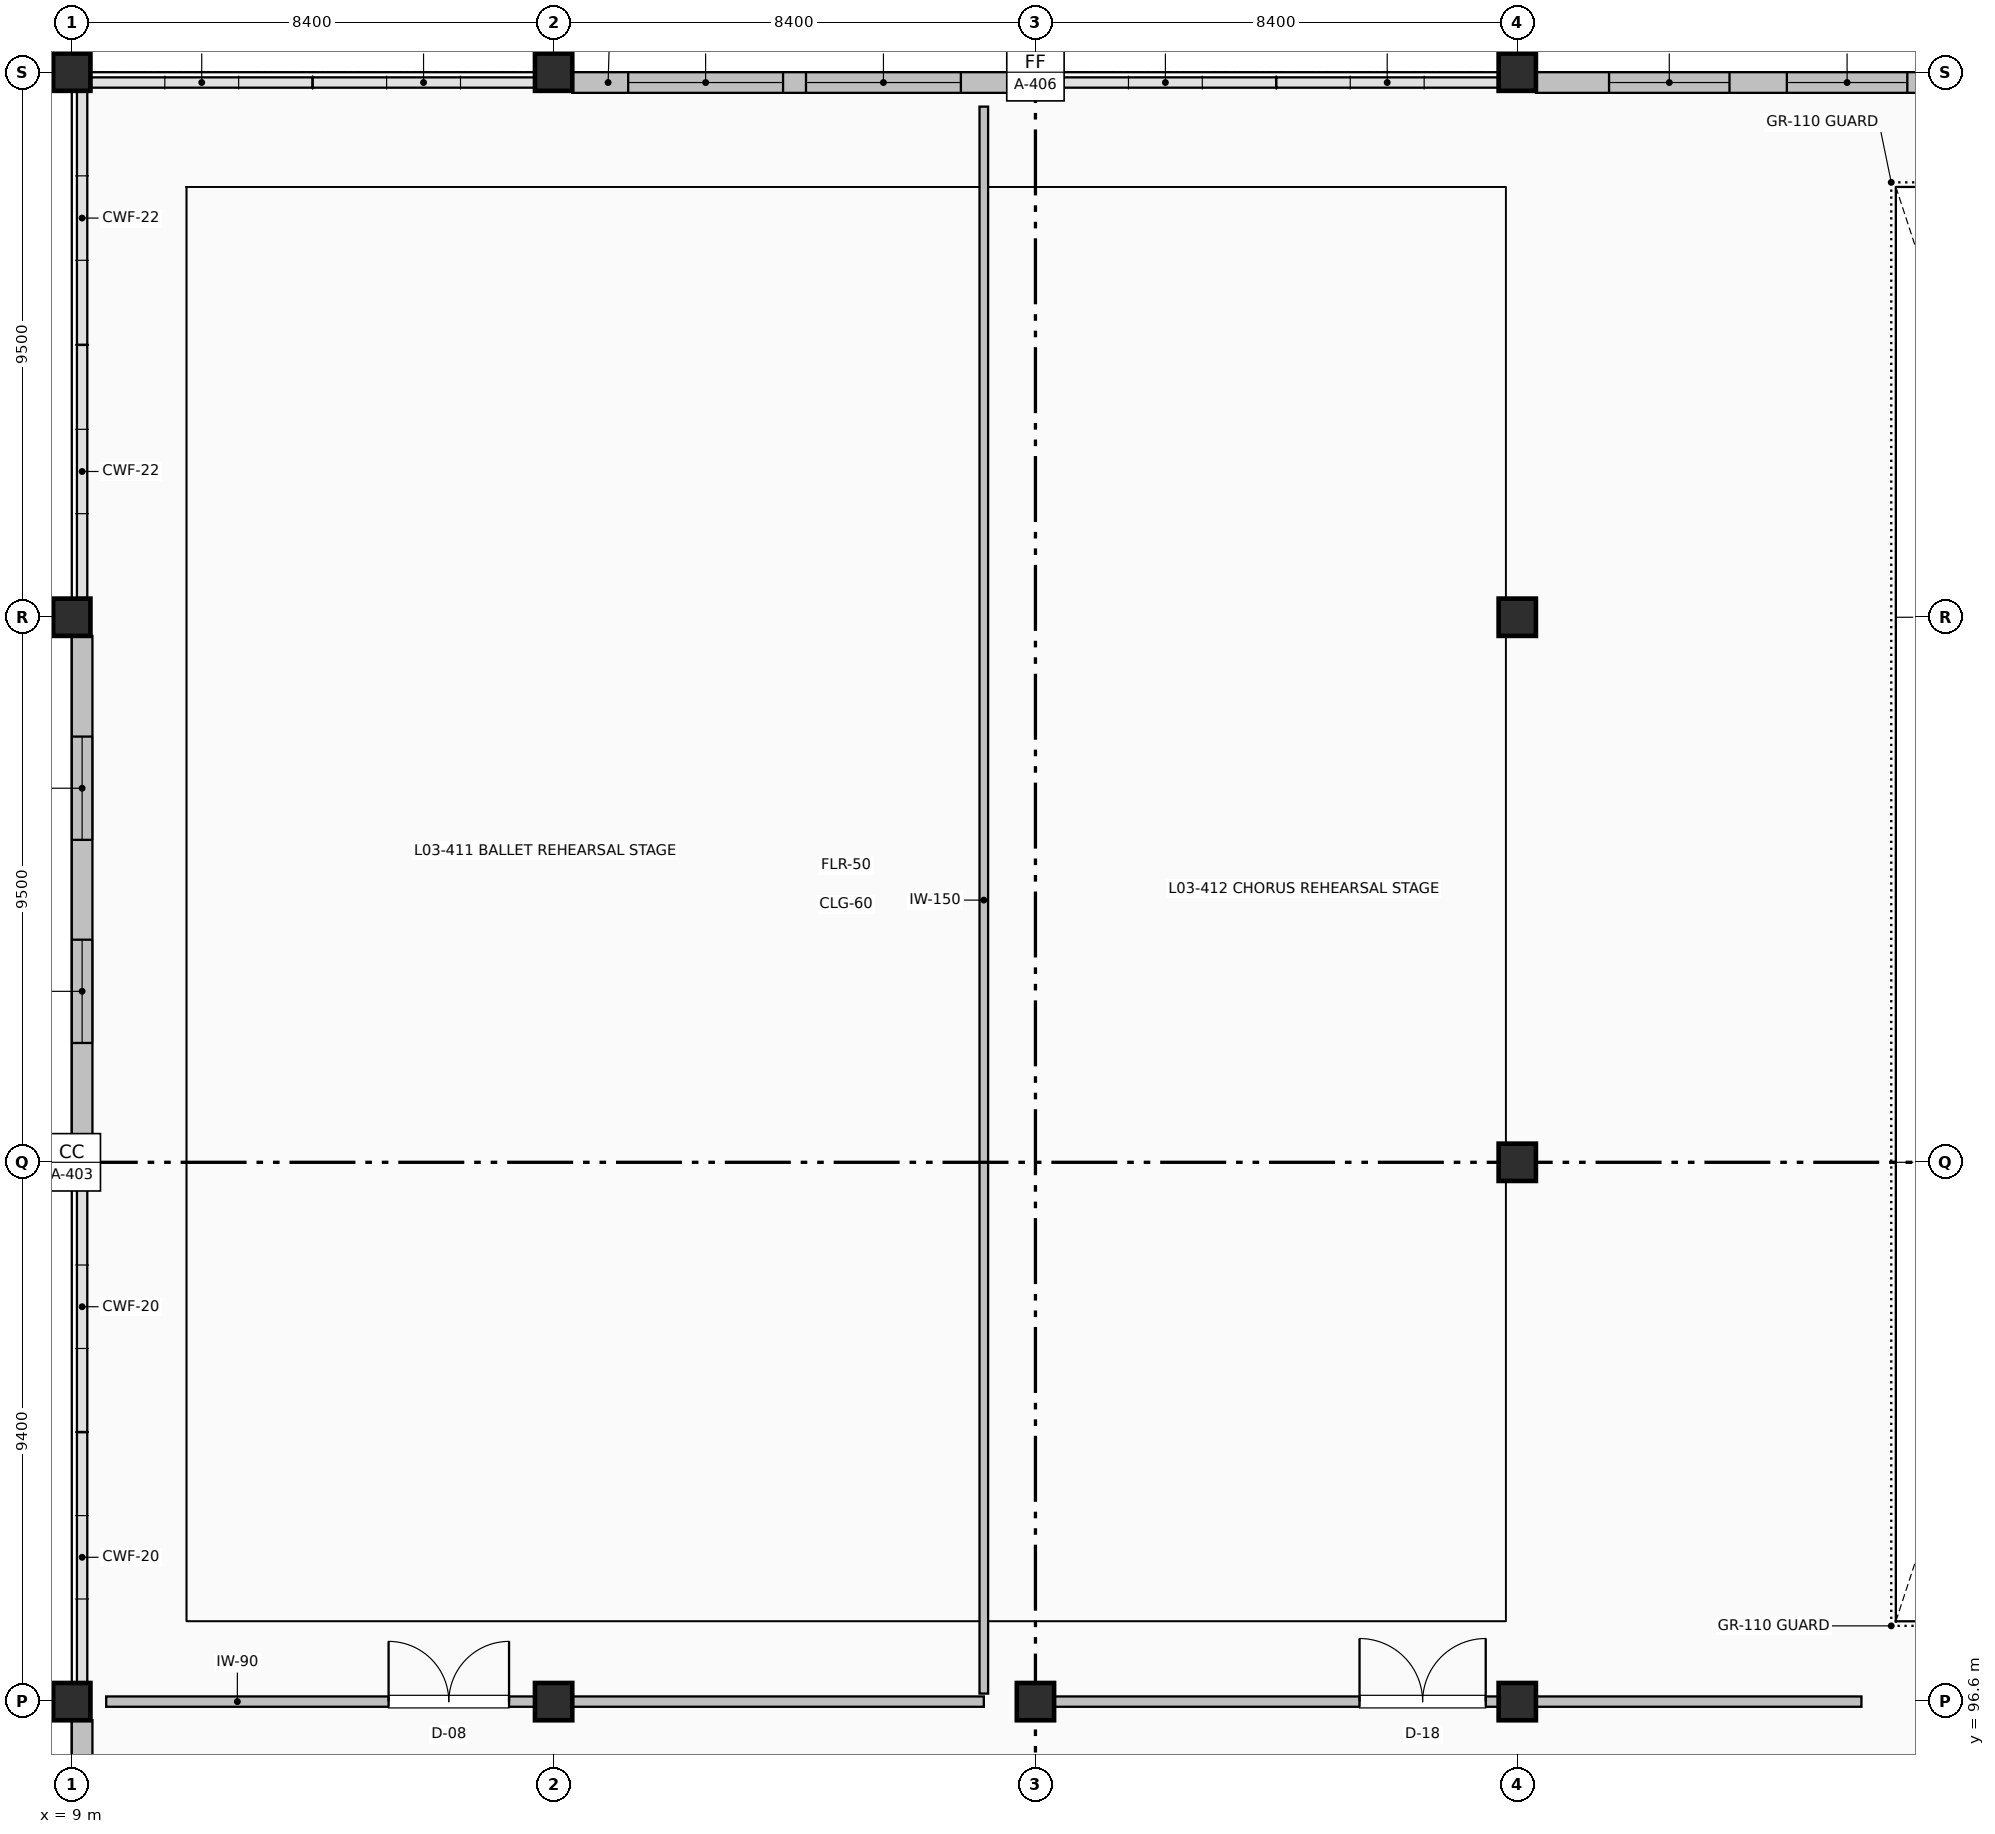
"""IFC4 building model, lengths in metres.
Left out: names, types, materials, properties, quantities, classifications, styles, units other than length and angle.
Written with IfcOpenShell. Run it as: python <this file> out.ifc"""

import sys

from ifc_helpers import new_model, si_unit, direction, frame, frame_2d, origin, origin_2d, place, context, subcontext, project, spatial, rectangle, extrude, element, fill, save


model = new_model("IFC4")
c1 = context("Model", 3, precision=1e-05, world=origin(), true_north=direction((0.0, 1.0)))
c2 = subcontext(c1, "Body", "Model", "MODEL_VIEW")
j1 = project(units=[si_unit("LENGTHUNIT", "METRE"), si_unit("PLANEANGLEUNIT", "RADIAN")], contexts=[c1])
p1 = place(None, origin())
s1 = spatial("IfcSite", under=j1, at=p1, CompositionType="ELEMENT")
p2 = place(p1, origin())
s2 = spatial("IfcBuilding", under=s1, at=p2, CompositionType="ELEMENT")
p3 = place(p2, frame((0.0, 0.0, 15.0)))
s3 = spatial("IfcBuildingStorey", under=s2, at=p3, CompositionType="ELEMENT", Elevation=15.0)
for number, where, z_axis, x_axis in (
    (1, (9.0, 96.6, 0.0), (0.0, 0.0, 1.0), (1.0, 0.0, 0.0)),
    (2, (9.0, 106.0, 0.0), (0.0, 0.0, 1.0), (1.0, 0.0, 0.0)),
    (3, (9.0, 115.5, 0.0), (0.0, 0.0, 1.0), (1.0, 0.0, 0.0)),
    (4, (9.0, 125.0, 0.0), (0.0, 0.0, 1.0), (1.0, 0.0, 0.0)),
    (5, (17.4, 96.6, 0.0), (0.0, 0.0, 1.0), (1.0, 0.0, 0.0)),
    (6, (17.4, 125.0, 0.0), (0.0, 0.0, 1.0), (1.0, 0.0, 0.0)),
    (7, (25.8, 96.6, 0.0), (0.0, 0.0, 1.0), (1.0, 0.0, 0.0)),
    (8, (25.8, 125.0, 0.0), (0.0, 0.0, 1.0), (1.0, 0.0, 0.0)),
    (9, (34.2, 96.6, 0.0), (0.0, 0.0, 1.0), (1.0, 0.0, 0.0)),
    (10, (34.2, 106.0, 0.0), (0.0, 0.0, 1.0), (1.0, 0.0, 0.0)),
    (11, (34.2, 115.5, 0.0), (0.0, 0.0, 1.0), (1.0, 0.0, 0.0)),
    (12, (34.2, 125.0, 0.0), (0.0, 0.0, 1.0), (1.0, 0.0, 0.0)),
):
    element("IfcColumn", number, at=place(p3, frame(where, z_axis=z_axis, x_axis=x_axis)), inside=s3, PredefinedType="COLUMN", context=c2, shape_type="SweptSolid", body=[
        extrude(rectangle(XDim=0.65, YDim=0.65, at=origin_2d()), origin(), (0.0, 0.0, 1.0), 4.5),
    ])
p4 = place(p3, frame((17.725, 124.82, 0.0), z_axis=(0.0, 0.0, 1.0), x_axis=(1.0, 0.0, 0.0)))
e13 = element("IfcWall", 13, at=p4, inside=s3, PredefinedType="SOLIDWALL", context=c2, shape_type="SweptSolid", body=[
    extrude(rectangle(XDim=7.75, YDim=0.36, at=frame_2d((3.875, 0.0))), origin(), (0.0, 0.0, 1.0), 4.2),
])
p5 = place(p4, frame((0.975, 0.0, 0.9)))
e14 = element("IfcOpeningElement", 14, at=p5, cuts=e13, PredefinedType="OPENING", context=c2, shape_type="SweptSolid", body=[
    extrude(rectangle(XDim=2.7, YDim=2.1, at=frame_2d((1.35, 1.05))), frame((0.0, 0.19, 0.0), z_axis=(0.0, -1.0, 0.0), x_axis=(1.0, 0.0, 0.0)), (0.0, 0.0, 1.0), 0.38),
])
p6 = place(p4, frame((4.075, 0.0, 0.9)))
e15 = element("IfcOpeningElement", 15, at=p6, cuts=e13, PredefinedType="OPENING", context=c2, shape_type="SweptSolid", body=[
    extrude(rectangle(XDim=2.7, YDim=2.1, at=frame_2d((1.35, 1.05))), frame((0.0, 0.19, 0.0), z_axis=(0.0, -1.0, 0.0), x_axis=(1.0, 0.0, 0.0)), (0.0, 0.0, 1.0), 0.38),
])
p7 = place(p3, frame((34.525, 124.82, 0.0), z_axis=(0.0, 0.0, 1.0), x_axis=(1.0, 0.0, 0.0)))
e16 = element("IfcWall", 16, at=p7, inside=s3, PredefinedType="SOLIDWALL", context=c2, shape_type="SweptSolid", body=[
    extrude(rectangle(XDim=7.75, YDim=0.36, at=frame_2d((3.875, 0.0))), origin(), (0.0, 0.0, 1.0), 4.2),
])
p8 = place(p7, frame((1.275, 0.0, 0.9)))
e17 = element("IfcOpeningElement", 17, at=p8, cuts=e16, PredefinedType="OPENING", context=c2, shape_type="SweptSolid", body=[
    extrude(rectangle(XDim=2.1, YDim=2.1, at=frame_2d((1.05, 1.05))), frame((0.0, 0.19, 0.0), z_axis=(0.0, -1.0, 0.0), x_axis=(1.0, 0.0, 0.0)), (0.0, 0.0, 1.0), 0.38),
])
p9 = place(p7, frame((4.375, 0.0, 0.9)))
e18 = element("IfcOpeningElement", 18, at=p9, cuts=e16, PredefinedType="OPENING", context=c2, shape_type="SweptSolid", body=[
    extrude(rectangle(XDim=2.1, YDim=2.1, at=frame_2d((1.05, 1.05))), frame((0.0, 0.19, 0.0), z_axis=(0.0, -1.0, 0.0), x_axis=(1.0, 0.0, 0.0)), (0.0, 0.0, 1.0), 0.38),
])
p10 = place(p3, frame((9.18, 87.61, 0.0), z_axis=(0.0, 0.0, 1.0), x_axis=(0.0, 1.0, 0.0)))
e19 = element("IfcWall", 19, at=p10, inside=s3, PredefinedType="SOLIDWALL", context=c2, shape_type="SweptSolid", body=[
    extrude(rectangle(XDim=8.665, YDim=0.36, at=frame_2d((4.333, 0.0))), origin(), (0.0, 0.0, 1.0), 3.709),
])
p11 = place(p10, frame((1.85, 0.0, 0.9)))
e20 = element("IfcOpeningElement", 20, at=p11, cuts=e19, PredefinedType="OPENING", context=c2, shape_type="SweptSolid", body=[
    extrude(rectangle(XDim=1.5, YDim=2.1, at=frame_2d((0.75, 1.05))), frame((0.0, 0.19, 0.0), z_axis=(0.0, -1.0, 0.0), x_axis=(1.0, 0.0, 0.0)), (0.0, 0.0, 1.0), 0.38),
])
p12 = place(p10, frame((5.316, 0.0, 0.9)))
e21 = element("IfcOpeningElement", 21, at=p12, cuts=e19, PredefinedType="OPENING", context=c2, shape_type="SweptSolid", body=[
    extrude(rectangle(XDim=1.5, YDim=2.1, at=frame_2d((0.75, 1.05))), frame((0.0, 0.19, 0.0), z_axis=(0.0, -1.0, 0.0), x_axis=(1.0, 0.0, 0.0)), (0.0, 0.0, 1.0), 0.38),
])
p13 = place(p3, frame((9.18, 106.325, 0.0), z_axis=(0.0, 0.0, 1.0), x_axis=(0.0, 1.0, 0.0)))
e22 = element("IfcWall", 22, at=p13, inside=s3, PredefinedType="SOLIDWALL", context=c2, shape_type="SweptSolid", body=[
    extrude(rectangle(XDim=8.85, YDim=0.36, at=frame_2d((4.425, 0.0))), origin(), (0.0, 0.0, 1.0), 3.709),
])
p14 = place(p13, frame((1.755, 0.0, 0.9)))
e23 = element("IfcOpeningElement", 23, at=p14, cuts=e22, PredefinedType="OPENING", context=c2, shape_type="SweptSolid", body=[
    extrude(rectangle(XDim=1.8, YDim=2.1, at=frame_2d((0.9, 1.05))), frame((0.0, 0.19, 0.0), z_axis=(0.0, -1.0, 0.0), x_axis=(1.0, 0.0, 0.0)), (0.0, 0.0, 1.0), 0.38),
])
p15 = place(p13, frame((5.295, 0.0, 0.9)))
e24 = element("IfcOpeningElement", 24, at=p15, cuts=e22, PredefinedType="OPENING", context=c2, shape_type="SweptSolid", body=[
    extrude(rectangle(XDim=1.8, YDim=2.1, at=frame_2d((0.9, 1.05))), frame((0.0, 0.19, 0.0), z_axis=(0.0, -1.0, 0.0), x_axis=(1.0, 0.0, 0.0)), (0.0, 0.0, 1.0), 0.38),
])
p16 = place(p3, frame((9.6, 96.6, 0.0), z_axis=(0.0, 0.0, 1.0), x_axis=(1.0, 0.0, 0.0)))
e25 = element("IfcWall", 25, at=p16, inside=s3, PredefinedType="PARTITIONING", context=c2, shape_type="SweptSolid", body=[
    extrude(rectangle(XDim=7.475, YDim=0.18, at=frame_2d((3.737, 0.0))), origin(), (0.0, 0.0, 1.0), 4.192),
])
p17 = place(p16, frame((4.923, 0.0, 0.0)))
e26 = element("IfcOpeningElement", 26, at=p17, cuts=e25, PredefinedType="OPENING", context=c2, shape_type="SweptSolid", body=[
    extrude(rectangle(XDim=2.1, YDim=2.25, at=frame_2d((1.05, 1.125))), frame((0.0, 0.1, 0.0), z_axis=(0.0, -1.0, 0.0), x_axis=(1.0, 0.0, 0.0)), (0.0, 0.0, 1.0), 0.2),
])
p18 = place(p3, frame((17.725, 96.6, 0.0), z_axis=(0.0, 0.0, 1.0), x_axis=(1.0, 0.0, 0.0)))
e27 = element("IfcWall", 27, at=p18, inside=s3, PredefinedType="PARTITIONING", context=c2, shape_type="SweptSolid", body=[
    extrude(rectangle(XDim=7.175, YDim=0.18, at=frame_2d((3.587, 0.0))), origin(), (0.0, 0.0, 1.0), 4.192),
])
p19 = place(p3, frame((24.9, 96.74, 0.0), z_axis=(0.0, 0.0, 1.0), x_axis=(0.0, 1.0, 0.0)))
e28 = element("IfcWall", 28, at=p19, inside=s3, PredefinedType="PARTITIONING", context=c2, shape_type="SweptSolid", body=[
    extrude(rectangle(XDim=27.66, YDim=0.15, at=frame_2d((13.83, 0.0))), origin(), (0.0, 0.0, 1.0), 4.192),
])
p20 = place(p3, frame((26.125, 96.6, 0.0), z_axis=(0.0, 0.0, 1.0), x_axis=(1.0, 0.0, 0.0)))
e29 = element("IfcWall", 29, at=p20, inside=s3, PredefinedType="PARTITIONING", context=c2, shape_type="SweptSolid", body=[
    extrude(rectangle(XDim=7.75, YDim=0.18, at=frame_2d((3.875, 0.0))), origin(), (0.0, 0.0, 1.0), 4.192),
])
p21 = place(p20, frame((5.325, 0.0, 0.0)))
e30 = element("IfcOpeningElement", 30, at=p21, cuts=e29, PredefinedType="OPENING", context=c2, shape_type="SweptSolid", body=[
    extrude(rectangle(XDim=2.2, YDim=2.32, at=frame_2d((1.1, 1.16))), frame((0.0, 0.1, 0.0), z_axis=(0.0, -1.0, 0.0), x_axis=(1.0, 0.0, 0.0)), (0.0, 0.0, 1.0), 0.2),
])
p22 = place(p3, frame((34.525, 96.6, 0.0), z_axis=(0.0, 0.0, 1.0), x_axis=(1.0, 0.0, 0.0)))
e31 = element("IfcWall", 31, at=p22, inside=s3, PredefinedType="PARTITIONING", context=c2, shape_type="SweptSolid", body=[
    extrude(rectangle(XDim=5.675, YDim=0.18, at=frame_2d((2.837, 0.0))), origin(), (0.0, 0.0, 1.0), 4.192),
])
p23 = place(p5, origin())
e32 = element("IfcWindow", 32, at=p23, inside=s3, PartitioningType="SINGLE_PANEL", PredefinedType="WINDOW", context=c2, shape_type="SweptSolid", body=[
    extrude(rectangle(XDim=2.7, YDim=2.1, at=frame_2d((1.35, 1.05))), frame((0.0, 0.03, 0.0), z_axis=(0.0, -1.0, 0.0), x_axis=(1.0, 0.0, 0.0)), (0.0, 0.0, 1.0), 0.06),
])
fill(e14, e32)
p24 = place(p6, origin())
e33 = element("IfcWindow", 33, at=p24, inside=s3, PartitioningType="SINGLE_PANEL", PredefinedType="WINDOW", context=c2, shape_type="SweptSolid", body=[
    extrude(rectangle(XDim=2.7, YDim=2.1, at=frame_2d((1.35, 1.05))), frame((0.0, 0.03, 0.0), z_axis=(0.0, -1.0, 0.0), x_axis=(1.0, 0.0, 0.0)), (0.0, 0.0, 1.0), 0.06),
])
fill(e15, e33)
p25 = place(p8, origin())
e34 = element("IfcWindow", 34, at=p25, inside=s3, PartitioningType="SINGLE_PANEL", PredefinedType="WINDOW", context=c2, shape_type="SweptSolid", body=[
    extrude(rectangle(XDim=2.1, YDim=2.1, at=frame_2d((1.05, 1.05))), frame((0.0, 0.03, 0.0), z_axis=(0.0, -1.0, 0.0), x_axis=(1.0, 0.0, 0.0)), (0.0, 0.0, 1.0), 0.06),
])
fill(e17, e34)
p26 = place(p9, origin())
e35 = element("IfcWindow", 35, at=p26, inside=s3, PartitioningType="SINGLE_PANEL", PredefinedType="WINDOW", context=c2, shape_type="SweptSolid", body=[
    extrude(rectangle(XDim=2.1, YDim=2.1, at=frame_2d((1.05, 1.05))), frame((0.0, 0.03, 0.0), z_axis=(0.0, -1.0, 0.0), x_axis=(1.0, 0.0, 0.0)), (0.0, 0.0, 1.0), 0.06),
])
fill(e18, e35)
p27 = place(p14, origin())
e36 = element("IfcWindow", 36, at=p27, inside=s3, PartitioningType="SINGLE_PANEL", PredefinedType="WINDOW", context=c2, shape_type="SweptSolid", body=[
    extrude(rectangle(XDim=1.8, YDim=2.1, at=frame_2d((0.9, 1.05))), frame((0.0, 0.03, 0.0), z_axis=(0.0, -1.0, 0.0), x_axis=(1.0, 0.0, 0.0)), (0.0, 0.0, 1.0), 0.06),
])
fill(e23, e36)
p28 = place(p15, origin())
e37 = element("IfcWindow", 37, at=p28, inside=s3, PartitioningType="SINGLE_PANEL", PredefinedType="WINDOW", context=c2, shape_type="SweptSolid", body=[
    extrude(rectangle(XDim=1.8, YDim=2.1, at=frame_2d((0.9, 1.05))), frame((0.0, 0.03, 0.0), z_axis=(0.0, -1.0, 0.0), x_axis=(1.0, 0.0, 0.0)), (0.0, 0.0, 1.0), 0.06),
])
fill(e24, e37)
p29 = place(p17, origin())
e38 = element("IfcDoor", 38, at=p29, inside=s3, OperationType="DOUBLE_DOOR_SINGLE_SWING", PredefinedType="DOOR", context=c2, shape_type="SweptSolid", body=[
    extrude(rectangle(XDim=2.1, YDim=2.25, at=frame_2d((1.05, 1.125))), frame((0.0, 0.025, 0.0), z_axis=(0.0, -1.0, 0.0), x_axis=(1.0, 0.0, 0.0)), (0.0, 0.0, 1.0), 0.05),
])
fill(e26, e38)
p30 = place(p21, origin())
e39 = element("IfcDoor", 39, at=p30, inside=s3, OperationType="DOUBLE_DOOR_SINGLE_SWING", PredefinedType="DOOR", context=c2, shape_type="SweptSolid", body=[
    extrude(rectangle(XDim=2.2, YDim=2.32, at=frame_2d((1.1, 1.16))), frame((0.0, 0.025, 0.0), z_axis=(0.0, -1.0, 0.0), x_axis=(1.0, 0.0, 0.0)), (0.0, 0.0, 1.0), 0.05),
])
fill(e30, e39)
save(model, sys.argv[1])
